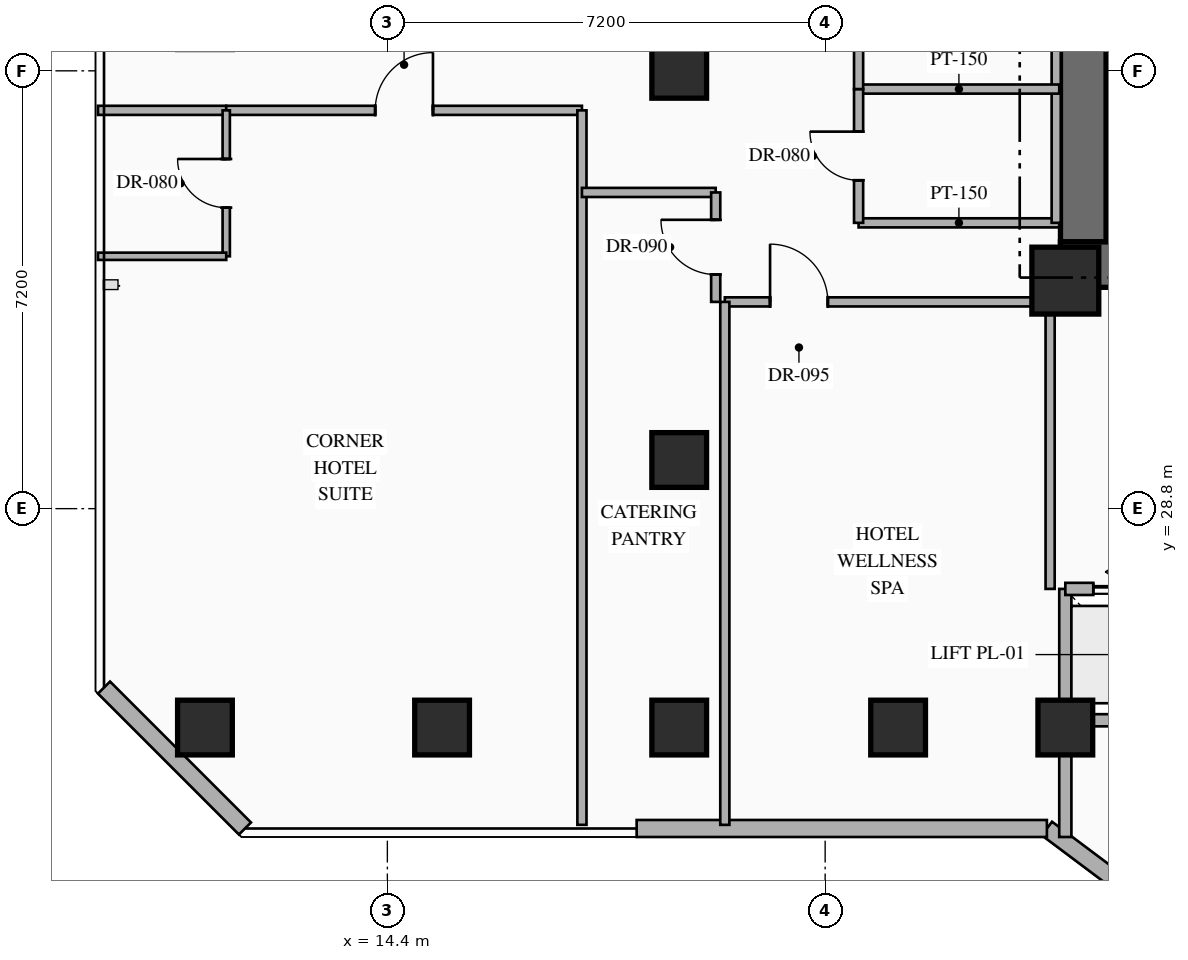
"""IFC4 building model, lengths in metres.
Left out: names, types, materials, properties, quantities, classifications, styles, units other than length and angle.
Written with IfcOpenShell. Run it as: python <this file> out.ifc"""

import sys

from ifc_helpers import new_model, si_unit, direction, frame, frame_2d, origin, origin_2d, place, context, subcontext, project, spatial, rectangle, hollow_rectangle, extrude, element, fill, save


model = new_model("IFC4")
c1 = context("Model", 3, precision=1e-05, world=origin(), true_north=direction((0.0, 1.0)))
c2 = subcontext(c1, "Body", "Model", "MODEL_VIEW")
j1 = project(units=[si_unit("LENGTHUNIT", "METRE"), si_unit("PLANEANGLEUNIT", "RADIAN")], contexts=[c1])
p1 = place(None, origin())
s1 = spatial("IfcSite", under=j1, at=p1, CompositionType="ELEMENT")
p2 = place(p1, origin())
s2 = spatial("IfcBuilding", under=s1, at=p2, CompositionType="ELEMENT")
p3 = place(p2, frame((0.0, 0.0, 81.3)))
s3 = spatial("IfcBuildingStorey", under=s2, at=p3, CompositionType="ELEMENT", Elevation=81.3)
p4 = place(p3, frame((25.47, 32.815, 0.0), z_axis=(0.0, 0.0, 1.0), x_axis=(1.0, 0.0, 0.0)))
e1 = element("IfcWall", 1, at=p4, inside=s3, PredefinedType="SHEAR", context=c2, shape_type="SweptSolid", body=[
    extrude(rectangle(XDim=8.08, YDim=0.75, at=frame_2d((4.04, 0.0))), origin(), (0.0, 0.0, 1.0), 3.35),
])
p5 = place(p4, frame((2.98, 0.0, 0.0)))
e2 = element("IfcOpeningElement", 2, at=p5, cuts=e1, PredefinedType="OPENING", context=c2, shape_type="SweptSolid", body=[
    extrude(rectangle(XDim=1.1, YDim=2.2, at=frame_2d((0.55, 1.1))), frame((0.0, 0.385, 0.0), z_axis=(0.0, -1.0, 0.0), x_axis=(1.0, 0.0, 0.0)), (0.0, 0.0, 1.0), 0.77),
])
p6 = place(p4, frame((5.73, 0.0, 0.0)))
e3 = element("IfcOpeningElement", 3, at=p6, cuts=e1, PredefinedType="OPENING", context=c2, shape_type="SweptSolid", body=[
    extrude(rectangle(XDim=1.1, YDim=2.15, at=frame_2d((0.55, 1.075))), frame((0.0, 0.385, 0.0), z_axis=(0.0, -1.0, 0.0), x_axis=(1.0, 0.0, 0.0)), (0.0, 0.0, 1.0), 0.77),
])
p7 = place(p3, frame((25.845, 33.19, 0.0), z_axis=(0.0, 0.0, 1.0), x_axis=(0.0, 1.0, 0.0)))
e4 = element("IfcWall", 4, at=p7, inside=s3, PredefinedType="SHEAR", context=c2, shape_type="SweptSolid", body=[
    extrude(rectangle(XDim=9.48, YDim=0.75, at=frame_2d((4.74, 0.0))), origin(), (0.0, 0.0, 1.0), 3.35),
])
p8 = place(p3, frame((25.55, 32.55, 0.0), z_axis=(0.0, 0.0, 1.0), x_axis=(1.0, 0.0, 0.0)))
e5 = element("IfcColumn", 5, at=p8, inside=s3, PredefinedType="COLUMN", context=c2, shape_type="SweptSolid", body=[
    extrude(rectangle(XDim=1.1, YDim=1.1, at=origin_2d()), origin(), (0.0, 0.0, 1.0), 3.35),
])
for number, where, z_axis, x_axis in (
    (6, (25.55, 25.2, 0.0), (0.0, 0.0, 1.0), (1.0, 0.0, 0.0)),
    (7, (11.4, 25.2, 0.0), (0.0, 0.0, 1.0), (1.0, 0.0, 0.0)),
    (8, (19.2, 25.2, 0.0), (0.0, 0.0, 1.0), (1.0, 0.0, 0.0)),
    (9, (19.2, 29.6, 0.0), (0.0, 0.0, 1.0), (1.0, 0.0, 0.0)),
    (10, (22.8, 25.2, 0.0), (0.0, 0.0, 1.0), (1.0, 0.0, 0.0)),
    (11, (19.2, 36.0, 0.0), (0.0, 0.0, 1.0), (1.0, 0.0, 0.0)),
    (12, (15.3, 25.2, 0.0), (0.0, 0.0, 1.0), (1.0, 0.0, 0.0)),
):
    element("IfcColumn", number, at=place(p3, frame(where, z_axis=z_axis, x_axis=x_axis)), inside=s3, PredefinedType="COLUMN", context=c2, shape_type="SweptSolid", body=[
        extrude(hollow_rectangle(XDim=0.9, YDim=0.9, WallThickness=0.036, at=origin_2d()), origin(), (0.0, 0.0, 1.0), 3.35),
    ])
p9 = place(p3, frame((53.318, 2.487, 0.0), z_axis=(0.0, 0.0, 1.0), x_axis=(-0.800004174678, 0.599994433723, 0.0)))
e13 = element("IfcWall", 13, at=p9, inside=s3, PredefinedType="STANDARD", context=c2, shape_type="SweptSolid", body=[
    extrude(rectangle(XDim=35.089, YDim=0.28, at=frame_2d((17.544, 0.0))), origin(), (0.0, 0.0, 1.0), 3.13),
])
p10 = place(p9, frame((1.931, 0.0, 0.85)))
e14 = element("IfcOpeningElement", 14, at=p10, cuts=e13, PredefinedType="OPENING", context=c2, shape_type="SweptSolid", body=[
    extrude(rectangle(XDim=1.4, YDim=1.8, at=frame_2d((0.7, 0.9))), frame((0.0, 0.15, 0.0), z_axis=(0.0, -1.0, 0.0), x_axis=(1.0, 0.0, 0.0)), (0.0, 0.0, 1.0), 0.3),
])
p11 = place(p9, frame((6.819, 0.0, 0.85)))
e15 = element("IfcOpeningElement", 15, at=p11, cuts=e13, PredefinedType="OPENING", context=c2, shape_type="SweptSolid", body=[
    extrude(rectangle(XDim=1.4, YDim=1.8, at=frame_2d((0.7, 0.9))), frame((0.0, 0.15, 0.0), z_axis=(0.0, -1.0, 0.0), x_axis=(1.0, 0.0, 0.0)), (0.0, 0.0, 1.0), 0.3),
])
p12 = place(p9, frame((11.832, 0.0, 0.85)))
e16 = element("IfcOpeningElement", 16, at=p12, cuts=e13, PredefinedType="OPENING", context=c2, shape_type="SweptSolid", body=[
    extrude(rectangle(XDim=1.4, YDim=1.8, at=frame_2d((0.7, 0.9))), frame((0.0, 0.15, 0.0), z_axis=(0.0, -1.0, 0.0), x_axis=(1.0, 0.0, 0.0)), (0.0, 0.0, 1.0), 0.3),
])
p13 = place(p9, frame((17.647, 0.0, 0.85)))
e17 = element("IfcOpeningElement", 17, at=p13, cuts=e13, PredefinedType="OPENING", context=c2, shape_type="SweptSolid", body=[
    extrude(rectangle(XDim=1.4, YDim=1.8, at=frame_2d((0.7, 0.9))), frame((0.0, 0.15, 0.0), z_axis=(0.0, -1.0, 0.0), x_axis=(1.0, 0.0, 0.0)), (0.0, 0.0, 1.0), 0.3),
])
p14 = place(p9, frame((21.857, 0.0, 0.85)))
e18 = element("IfcOpeningElement", 18, at=p14, cuts=e13, PredefinedType="OPENING", context=c2, shape_type="SweptSolid", body=[
    extrude(rectangle(XDim=1.4, YDim=1.8, at=frame_2d((0.7, 0.9))), frame((0.0, 0.15, 0.0), z_axis=(0.0, -1.0, 0.0), x_axis=(1.0, 0.0, 0.0)), (0.0, 0.0, 1.0), 0.3),
])
p15 = place(p9, frame((26.87, 0.0, 0.85)))
e19 = element("IfcOpeningElement", 19, at=p15, cuts=e13, PredefinedType="OPENING", context=c2, shape_type="SweptSolid", body=[
    extrude(rectangle(XDim=1.4, YDim=1.8, at=frame_2d((0.7, 0.9))), frame((0.0, 0.15, 0.0), z_axis=(0.0, -1.0, 0.0), x_axis=(1.0, 0.0, 0.0)), (0.0, 0.0, 1.0), 0.3),
])
p16 = place(p9, frame((31.757, 0.0, 0.85)))
e20 = element("IfcOpeningElement", 20, at=p16, cuts=e13, PredefinedType="OPENING", context=c2, shape_type="SweptSolid", body=[
    extrude(rectangle(XDim=1.4, YDim=1.8, at=frame_2d((0.7, 0.9))), frame((0.0, 0.15, 0.0), z_axis=(0.0, -1.0, 0.0), x_axis=(1.0, 0.0, 0.0)), (0.0, 0.0, 1.0), 0.3),
])
p17 = place(p3, frame((25.247, 23.54, 0.0), z_axis=(0.0, 0.0, 1.0), x_axis=(-1.0, 0.0, 0.0)))
e21 = element("IfcWall", 21, at=p17, inside=s3, PredefinedType="STANDARD", context=c2, shape_type="SweptSolid", body=[
    extrude(rectangle(XDim=6.747, YDim=0.28, at=frame_2d((3.374, 0.0))), origin(), (0.0, 0.0, 1.0), 3.13),
])
p18 = place(p3, frame((12.058, 23.54, 0.0), z_axis=(0.0, 0.0, 1.0), x_axis=(-0.707144017911, 0.707069542501, 0.0)))
e22 = element("IfcWall", 22, at=p18, inside=s3, PredefinedType="STANDARD", context=c2, shape_type="SweptSolid", body=[
    extrude(rectangle(XDim=3.278, YDim=0.28, at=frame_2d((1.639, 0.0))), origin(), (0.0, 0.0, 1.0), 3.13),
])
p19 = place(p3, frame((25.55, 23.4, 0.0), z_axis=(0.0, 0.0, 1.0), x_axis=(0.0, 1.0, 0.0)))
e23 = element("IfcWall", 23, at=p19, inside=s3, PredefinedType="STANDARD", context=c2, shape_type="SweptSolid", body=[
    extrude(rectangle(XDim=4.08, YDim=0.2, at=frame_2d((2.04, 0.0))), origin(), (0.0, 0.0, 1.0), 2.425),
])
p20 = place(p3, frame((25.55, 25.32, 0.0), z_axis=(0.0, 0.0, 1.0), x_axis=(1.0, 0.0, 0.0)))
e24 = element("IfcWall", 24, at=p20, inside=s3, PredefinedType="STANDARD", context=c2, shape_type="SweptSolid", body=[
    extrude(rectangle(XDim=7.88, YDim=0.2, at=frame_2d((3.94, 0.0))), origin(), (0.0, 0.0, 1.0), 2.525),
])
p21 = place(p3, frame((25.55, 27.48, 0.0), z_axis=(0.0, 0.0, 1.0), x_axis=(1.0, 0.0, 0.0)))
e25 = element("IfcWall", 25, at=p21, inside=s3, PredefinedType="STANDARD", context=c2, shape_type="SweptSolid", body=[
    extrude(rectangle(XDim=7.88, YDim=0.2, at=frame_2d((3.94, 0.0))), origin(), (0.0, 0.0, 1.0), 3.13),
])
p22 = place(p21, frame((0.46, 0.0, 0.0)))
e26 = element("IfcOpeningElement", 26, at=p22, cuts=e25, PredefinedType="OPENING", context=c2, shape_type="SweptSolid", body=[
    extrude(rectangle(XDim=1.08, YDim=2.15, at=frame_2d((0.54, 1.075))), frame((0.0, 0.11, 0.0), z_axis=(0.0, -1.0, 0.0), x_axis=(1.0, 0.0, 0.0)), (0.0, 0.0, 1.0), 0.22),
])
p23 = place(p21, frame((2.42, 0.0, 0.0)))
e27 = element("IfcOpeningElement", 27, at=p23, cuts=e25, PredefinedType="OPENING", context=c2, shape_type="SweptSolid", body=[
    extrude(rectangle(XDim=1.08, YDim=2.15, at=frame_2d((0.54, 1.075))), frame((0.0, 0.11, 0.0), z_axis=(0.0, -1.0, 0.0), x_axis=(1.0, 0.0, 0.0)), (0.0, 0.0, 1.0), 0.22),
])
p24 = place(p21, frame((4.38, 0.0, 0.0)))
e28 = element("IfcOpeningElement", 28, at=p24, cuts=e25, PredefinedType="OPENING", context=c2, shape_type="SweptSolid", body=[
    extrude(rectangle(XDim=1.08, YDim=2.15, at=frame_2d((0.54, 1.075))), frame((0.0, 0.11, 0.0), z_axis=(0.0, -1.0, 0.0), x_axis=(1.0, 0.0, 0.0)), (0.0, 0.0, 1.0), 0.22),
])
p25 = place(p21, frame((6.34, 0.0, 0.0)))
e29 = element("IfcOpeningElement", 29, at=p25, cuts=e25, PredefinedType="OPENING", context=c2, shape_type="SweptSolid", body=[
    extrude(rectangle(XDim=1.08, YDim=2.15, at=frame_2d((0.54, 1.075))), frame((0.0, 0.11, 0.0), z_axis=(0.0, -1.0, 0.0), x_axis=(1.0, 0.0, 0.0)), (0.0, 0.0, 1.0), 0.22),
])
p26 = place(p3, frame((22.15, 33.5, 0.0), z_axis=(0.0, 0.0, 1.0), x_axis=(1.0, 0.0, 0.0)))
e30 = element("IfcWall", 30, at=p26, inside=s3, PredefinedType="PARTITIONING", context=c2, shape_type="SweptSolid", body=[
    extrude(rectangle(XDim=3.3, YDim=0.15, at=frame_2d((1.65, 0.0))), origin(), (0.0, 0.0, 1.0), 3.13),
])
p27 = place(p3, frame((25.4, 33.5, 0.0), z_axis=(0.0, 0.0, 1.0), x_axis=(0.0, 1.0, 0.0)))
e31 = element("IfcWall", 31, at=p27, inside=s3, PredefinedType="PARTITIONING", context=c2, shape_type="SweptSolid", body=[
    extrude(rectangle(XDim=6.6, YDim=0.15, at=frame_2d((3.3, 0.0))), origin(), (0.0, 0.0, 1.0), 3.13),
])
p28 = place(p3, frame((22.15, 35.7, 0.0), z_axis=(0.0, 0.0, 1.0), x_axis=(1.0, 0.0, 0.0)))
e32 = element("IfcWall", 32, at=p28, inside=s3, PredefinedType="PARTITIONING", context=c2, shape_type="SweptSolid", body=[
    extrude(rectangle(XDim=3.3, YDim=0.15, at=frame_2d((1.65, 0.0))), origin(), (0.0, 0.0, 1.0), 3.13),
])
p29 = place(p3, frame((22.15, 33.5, 0.0), z_axis=(0.0, 0.0, 1.0), x_axis=(0.0, 1.0, 0.0)))
e33 = element("IfcWall", 33, at=p29, inside=s3, PredefinedType="PARTITIONING", context=c2, shape_type="SweptSolid", body=[
    extrude(rectangle(XDim=2.2, YDim=0.15, at=frame_2d((1.1, 0.0))), origin(), (0.0, 0.0, 1.0), 3.13),
])
p30 = place(p29, frame((0.7, 0.0, 0.0)))
e34 = element("IfcOpeningElement", 34, at=p30, cuts=e33, PredefinedType="OPENING", context=c2, shape_type="SweptSolid", body=[
    extrude(rectangle(XDim=0.8, YDim=2.06, at=frame_2d((0.4, 1.03))), frame((0.0, 0.085, 0.0), z_axis=(0.0, -1.0, 0.0), x_axis=(1.0, 0.0, 0.0)), (0.0, 0.0, 1.0), 0.17),
])
p31 = place(p3, frame((22.15, 35.7, 0.0), z_axis=(0.0, 0.0, 1.0), x_axis=(0.0, 1.0, 0.0)))
e35 = element("IfcWall", 35, at=p31, inside=s3, PredefinedType="PARTITIONING", context=c2, shape_type="SweptSolid", body=[
    extrude(rectangle(XDim=2.2, YDim=0.15, at=frame_2d((1.1, 0.0))), origin(), (0.0, 0.0, 1.0), 3.13),
])
p32 = place(p31, frame((0.7, 0.0, 0.0)))
e36 = element("IfcOpeningElement", 36, at=p32, cuts=e35, PredefinedType="OPENING", context=c2, shape_type="SweptSolid", body=[
    extrude(rectangle(XDim=0.8, YDim=2.06, at=frame_2d((0.4, 1.03))), frame((0.0, 0.085, 0.0), z_axis=(0.0, -1.0, 0.0), x_axis=(1.0, 0.0, 0.0)), (0.0, 0.0, 1.0), 0.17),
])
p33 = place(p3, frame((19.95, 32.2, 0.0), z_axis=(0.0, 0.0, 1.0), x_axis=(1.0, 0.0, 0.0)))
e37 = element("IfcWall", 37, at=p33, inside=s3, PredefinedType="PARTITIONING", context=c2, shape_type="SweptSolid", body=[
    extrude(rectangle(XDim=5.35, YDim=0.15, at=frame_2d((2.675, 0.0))), origin(), (0.0, 0.0, 1.0), 3.13),
])
p34 = place(p33, frame((0.744, 0.0, 0.0)))
e38 = element("IfcOpeningElement", 38, at=p34, cuts=e37, PredefinedType="OPENING", context=c2, shape_type="SweptSolid", body=[
    extrude(rectangle(XDim=0.95, YDim=2.15, at=frame_2d((0.475, 1.075))), frame((0.0, 0.085, 0.0), z_axis=(0.0, -1.0, 0.0), x_axis=(1.0, 0.0, 0.0)), (0.0, 0.0, 1.0), 0.17),
])
p35 = place(p3, frame((19.95, 23.6, 0.0), z_axis=(0.0, 0.0, 1.0), x_axis=(0.0, 1.0, 0.0)))
e39 = element("IfcWall", 39, at=p35, inside=s3, PredefinedType="PARTITIONING", context=c2, shape_type="SweptSolid", body=[
    extrude(rectangle(XDim=8.6, YDim=0.15, at=frame_2d((4.3, 0.0))), origin(), (0.0, 0.0, 1.0), 3.13),
])
p36 = place(p3, frame((25.3, 27.48, 0.0), z_axis=(0.0, 0.0, 1.0), x_axis=(0.0, 1.0, 0.0)))
e40 = element("IfcWall", 40, at=p36, inside=s3, PredefinedType="PARTITIONING", context=c2, shape_type="SweptSolid", body=[
    extrude(rectangle(XDim=4.72, YDim=0.15, at=frame_2d((2.36, 0.0))), origin(), (0.0, 0.0, 1.0), 2.425),
])
p37 = place(p3, frame((9.64, 35.35, 0.0), z_axis=(0.0, 0.0, 1.0), x_axis=(1.0, 0.0, 0.0)))
e41 = element("IfcWall", 41, at=p37, inside=s3, PredefinedType="PARTITIONING", context=c2, shape_type="SweptSolid", body=[
    extrude(rectangle(XDim=2.11, YDim=0.15, at=frame_2d((1.055, 0.0))), origin(), (0.0, 0.0, 1.0), 3.13),
])
p38 = place(p3, frame((11.75, 35.35, 0.0), z_axis=(0.0, 0.0, 1.0), x_axis=(1.0, 0.0, 0.0)))
e42 = element("IfcWall", 42, at=p38, inside=s3, PredefinedType="PARTITIONING", context=c2, shape_type="SweptSolid", body=[
    extrude(rectangle(XDim=5.85, YDim=0.15, at=frame_2d((2.925, 0.0))), origin(), (0.0, 0.0, 1.0), 3.13),
])
p39 = place(p38, frame((2.45, 0.0, 0.0)))
e43 = element("IfcOpeningElement", 43, at=p39, cuts=e42, PredefinedType="OPENING", context=c2, shape_type="SweptSolid", body=[
    extrude(rectangle(XDim=0.95, YDim=2.15, at=frame_2d((0.475, 1.075))), frame((0.0, 0.085, 0.0), z_axis=(0.0, -1.0, 0.0), x_axis=(1.0, 0.0, 0.0)), (0.0, 0.0, 1.0), 0.17),
])
p40 = place(p3, frame((11.75, 32.95, 0.0), z_axis=(0.0, 0.0, 1.0), x_axis=(0.0, 1.0, 0.0)))
e44 = element("IfcWall", 44, at=p40, inside=s3, PredefinedType="PARTITIONING", context=c2, shape_type="SweptSolid", body=[
    extrude(rectangle(XDim=2.4, YDim=0.12, at=frame_2d((1.2, 0.0))), origin(), (0.0, 0.0, 1.0), 3.13),
])
p41 = place(p40, frame((0.8, 0.0, 0.0)))
e45 = element("IfcOpeningElement", 45, at=p41, cuts=e44, PredefinedType="OPENING", context=c2, shape_type="SweptSolid", body=[
    extrude(rectangle(XDim=0.8, YDim=2.06, at=frame_2d((0.4, 1.03))), frame((0.0, 0.07, 0.0), z_axis=(0.0, -1.0, 0.0), x_axis=(1.0, 0.0, 0.0)), (0.0, 0.0, 1.0), 0.14),
])
p42 = place(p3, frame((9.64, 32.95, 0.0), z_axis=(0.0, 0.0, 1.0), x_axis=(1.0, 0.0, 0.0)))
e46 = element("IfcWall", 46, at=p42, inside=s3, PredefinedType="PARTITIONING", context=c2, shape_type="SweptSolid", body=[
    extrude(rectangle(XDim=2.11, YDim=0.12, at=frame_2d((1.055, 0.0))), origin(), (0.0, 0.0, 1.0), 3.13),
])
p43 = place(p3, frame((17.6, 23.6, 0.0), z_axis=(0.0, 0.0, 1.0), x_axis=(0.0, 1.0, 0.0)))
e47 = element("IfcWall", 47, at=p43, inside=s3, PredefinedType="PARTITIONING", context=c2, shape_type="SweptSolid", body=[
    extrude(rectangle(XDim=11.75, YDim=0.15, at=frame_2d((5.875, 0.0))), origin(), (0.0, 0.0, 1.0), 3.13),
])
p44 = place(p3, frame((17.6, 34.0, 0.0), z_axis=(0.0, 0.0, 1.0), x_axis=(1.0, 0.0, 0.0)))
e48 = element("IfcWall", 48, at=p44, inside=s3, PredefinedType="PARTITIONING", context=c2, shape_type="SweptSolid", body=[
    extrude(rectangle(XDim=2.2, YDim=0.15, at=frame_2d((1.1, 0.0))), origin(), (0.0, 0.0, 1.0), 3.13),
])
p45 = place(p3, frame((19.8, 32.2, 0.0), z_axis=(0.0, 0.0, 1.0), x_axis=(0.0, 1.0, 0.0)))
e49 = element("IfcWall", 49, at=p45, inside=s3, PredefinedType="PARTITIONING", context=c2, shape_type="SweptSolid", body=[
    extrude(rectangle(XDim=1.8, YDim=0.15, at=frame_2d((0.9, 0.0))), origin(), (0.0, 0.0, 1.0), 3.13),
])
p46 = place(p45, frame((0.45, 0.0, 0.0)))
e50 = element("IfcOpeningElement", 50, at=p46, cuts=e49, PredefinedType="OPENING", context=c2, shape_type="SweptSolid", body=[
    extrude(rectangle(XDim=0.9, YDim=2.15, at=frame_2d((0.45, 1.075))), frame((0.0, 0.085, 0.0), z_axis=(0.0, -1.0, 0.0), x_axis=(1.0, 0.0, 0.0)), (0.0, 0.0, 1.0), 0.17),
])
p47 = place(p22, origin())
e51 = element("IfcDoor", 51, at=p47, inside=s3, OperationType="SLIDING_TO_LEFT", PredefinedType="USERDEFINED", context=c2, shape_type="SweptSolid", body=[
    extrude(rectangle(XDim=1.08, YDim=2.15, at=frame_2d((0.54, 1.075))), frame((0.0, 0.025, 0.0), z_axis=(0.0, -1.0, 0.0), x_axis=(1.0, 0.0, 0.0)), (0.0, 0.0, 1.0), 0.05),
])
fill(e26, e51)
p48 = place(p30, origin())
e52 = element("IfcDoor", 52, at=p48, inside=s3, OperationType="SINGLE_SWING_RIGHT", PredefinedType="DOOR", context=c2, shape_type="SweptSolid", body=[
    extrude(rectangle(XDim=0.8, YDim=2.06, at=frame_2d((0.4, 1.03))), frame((0.0, 0.025, 0.0), z_axis=(0.0, -1.0, 0.0), x_axis=(1.0, 0.0, 0.0)), (0.0, 0.0, 1.0), 0.05),
])
fill(e34, e52)
p49 = place(p34, origin())
e53 = element("IfcDoor", 53, at=p49, inside=s3, OperationType="SINGLE_SWING_LEFT", PredefinedType="DOOR", context=c2, shape_type="SweptSolid", body=[
    extrude(rectangle(XDim=0.95, YDim=2.15, at=frame_2d((0.475, 1.075))), frame((0.0, 0.025, 0.0), z_axis=(0.0, -1.0, 0.0), x_axis=(1.0, 0.0, 0.0)), (0.0, 0.0, 1.0), 0.05),
])
fill(e38, e53)
p50 = place(p39, origin())
e54 = element("IfcDoor", 54, at=p50, inside=s3, OperationType="SINGLE_SWING_RIGHT", PredefinedType="DOOR", context=c2, shape_type="SweptSolid", body=[
    extrude(rectangle(XDim=0.95, YDim=2.15, at=frame_2d((0.475, 1.075))), frame((0.0, 0.025, 0.0), z_axis=(0.0, -1.0, 0.0), x_axis=(1.0, 0.0, 0.0)), (0.0, 0.0, 1.0), 0.05),
])
fill(e43, e54)
p51 = place(p41, origin())
e55 = element("IfcDoor", 55, at=p51, inside=s3, OperationType="SINGLE_SWING_RIGHT", PredefinedType="DOOR", context=c2, shape_type="SweptSolid", body=[
    extrude(rectangle(XDim=0.8, YDim=2.06, at=frame_2d((0.4, 1.03))), frame((0.0, 0.025, 0.0), z_axis=(0.0, -1.0, 0.0), x_axis=(1.0, 0.0, 0.0)), (0.0, 0.0, 1.0), 0.05),
])
fill(e45, e55)
p52 = place(p46, origin())
e56 = element("IfcDoor", 56, at=p52, inside=s3, OperationType="SINGLE_SWING_RIGHT", PredefinedType="DOOR", context=c2, shape_type="SweptSolid", body=[
    extrude(rectangle(XDim=0.9, YDim=2.15, at=frame_2d((0.45, 1.075))), frame((0.0, 0.025, 0.0), z_axis=(0.0, -1.0, 0.0), x_axis=(1.0, 0.0, 0.0)), (0.0, 0.0, 1.0), 0.05),
])
fill(e50, e56)
save(model, sys.argv[1])
